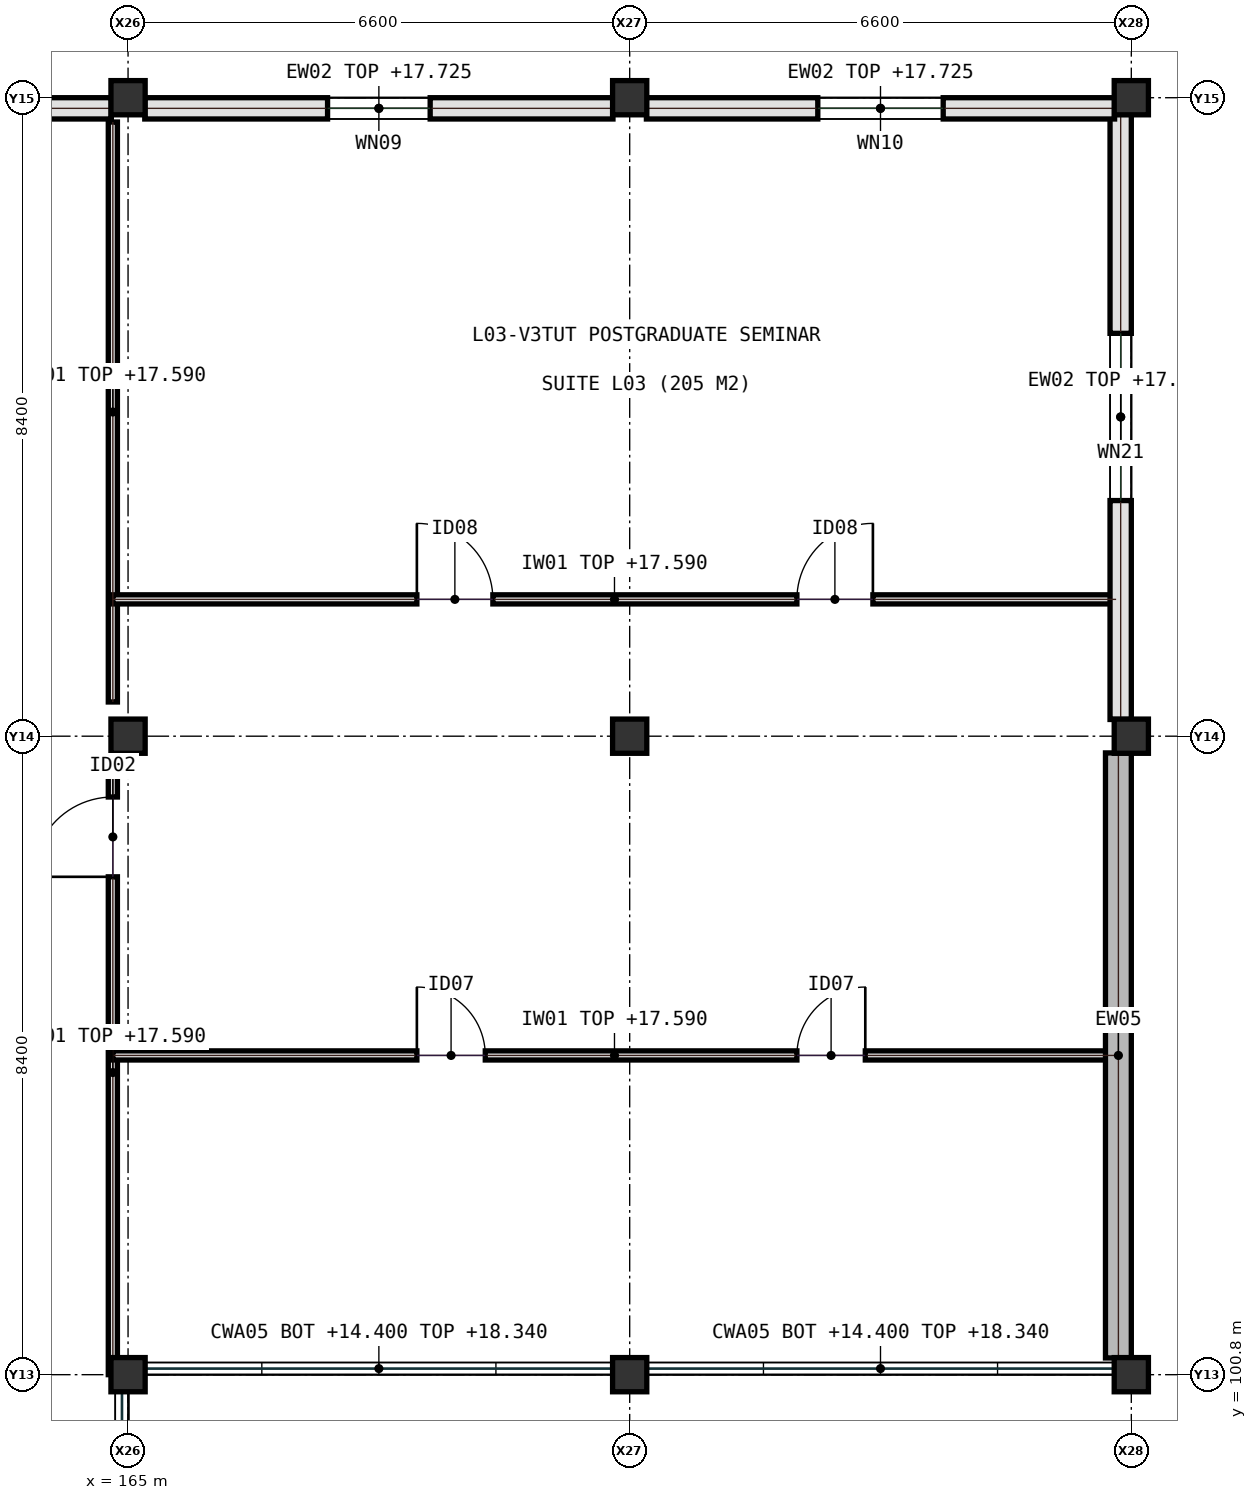
"""IFC4 building model, lengths in metres.
Left out: names, types, materials, properties, quantities, classifications, styles, units other than length and angle.
Written with IfcOpenShell. Run it as: python <this file> out.ifc"""

import sys

from ifc_helpers import new_model, si_unit, direction, frame, frame_2d, origin, origin_2d, place, context, subcontext, project, spatial, rectangle, extrude, element, fill, save


model = new_model("IFC4")
c1 = context("Model", 3, precision=1e-05, world=origin(), true_north=direction((0.0, 1.0)))
c2 = subcontext(c1, "Body", "Model", "MODEL_VIEW")
j1 = project(units=[si_unit("LENGTHUNIT", "METRE"), si_unit("PLANEANGLEUNIT", "RADIAN")], contexts=[c1])
p1 = place(None, origin())
s1 = spatial("IfcSite", under=j1, at=p1, CompositionType="ELEMENT")
p2 = place(p1, origin())
s2 = spatial("IfcBuilding", under=s1, at=p2, CompositionType="ELEMENT")
p3 = place(p2, frame((0.0, 0.0, 14.4)))
s3 = spatial("IfcBuildingStorey", under=s2, at=p3, CompositionType="ELEMENT", Elevation=14.4)
for number, where, z_axis, x_axis in (
    (1, (165.0, 100.8, 0.0), (0.0, 0.0, 1.0), (1.0, 0.0, 0.0)),
    (2, (165.0, 109.2, 0.0), (0.0, 0.0, 1.0), (1.0, 0.0, 0.0)),
    (3, (165.0, 117.6, 0.0), (0.0, 0.0, 1.0), (1.0, 0.0, 0.0)),
    (4, (171.6, 100.8, 0.0), (0.0, 0.0, 1.0), (1.0, 0.0, 0.0)),
    (5, (171.6, 109.2, 0.0), (0.0, 0.0, 1.0), (1.0, 0.0, 0.0)),
    (6, (171.6, 117.6, 0.0), (0.0, 0.0, 1.0), (1.0, 0.0, 0.0)),
    (7, (178.2, 100.8, 0.0), (0.0, 0.0, 1.0), (1.0, 0.0, 0.0)),
    (8, (178.2, 109.2, 0.0), (0.0, 0.0, 1.0), (1.0, 0.0, 0.0)),
    (9, (178.2, 117.6, 0.0), (0.0, 0.0, 1.0), (1.0, 0.0, 0.0)),
):
    element("IfcColumn", number, at=place(p3, frame(where, z_axis=z_axis, x_axis=x_axis)), inside=s3, PredefinedType="COLUMN", context=c2, shape_type="SweptSolid", body=[
        extrude(rectangle(XDim=0.45, YDim=0.45, at=origin_2d()), origin(), (0.0, 0.0, 1.0), 4.2),
    ])
p4 = place(p3, frame((164.8, 100.8, 0.0), z_axis=(0.0, 0.0, 1.0), x_axis=(0.0, 1.0, 0.0)))
e10 = element("IfcWall", 10, at=p4, inside=s3, PredefinedType="PARTITIONING", context=c2, shape_type="SweptSolid", body=[
    extrude(rectangle(XDim=7.95, YDim=0.12, at=frame_2d((3.975, 0.0))), origin(), (0.0, 0.0, 1.0), 3.19),
])
p5 = place(p4, frame((6.55, 0.0, 0.0)))
e11 = element("IfcOpeningElement", 11, at=p5, cuts=e10, PredefinedType="OPENING", context=c2, shape_type="SweptSolid", body=[
    extrude(rectangle(XDim=1.05, YDim=2.15, at=frame_2d((0.525, 1.075))), frame((0.0, 0.07, 0.0), z_axis=(0.0, -1.0, 0.0), x_axis=(1.0, 0.0, 0.0)), (0.0, 0.0, 1.0), 0.14),
])
p6 = place(p3, frame((164.8, 109.65, 0.0), z_axis=(0.0, 0.0, 1.0), x_axis=(0.0, 1.0, 0.0)))
e12 = element("IfcWall", 12, at=p6, inside=s3, PredefinedType="PARTITIONING", context=c2, shape_type="SweptSolid", body=[
    extrude(rectangle(XDim=7.63, YDim=0.12, at=frame_2d((3.815, 0.0))), origin(), (0.0, 0.0, 1.0), 3.19),
])
p7 = place(p3, frame((164.8, 105.0, 0.0), z_axis=(0.0, 0.0, 1.0), x_axis=(1.0, 0.0, 0.0)))
e13 = element("IfcWall", 13, at=p7, inside=s3, PredefinedType="PARTITIONING", context=c2, shape_type="SweptSolid", body=[
    extrude(rectangle(XDim=13.2, YDim=0.12, at=frame_2d((6.6, 0.0))), origin(), (0.0, 0.0, 1.0), 3.19),
])
p8 = place(p7, frame((4.0, 0.0, 0.0)))
e14 = element("IfcOpeningElement", 14, at=p8, cuts=e13, PredefinedType="OPENING", context=c2, shape_type="SweptSolid", body=[
    extrude(rectangle(XDim=0.9, YDim=2.1, at=frame_2d((0.45, 1.05))), frame((0.0, 0.07, 0.0), z_axis=(0.0, -1.0, 0.0), x_axis=(1.0, 0.0, 0.0)), (0.0, 0.0, 1.0), 0.14),
])
p9 = place(p7, frame((9.0, 0.0, 0.0)))
e15 = element("IfcOpeningElement", 15, at=p9, cuts=e13, PredefinedType="OPENING", context=c2, shape_type="SweptSolid", body=[
    extrude(rectangle(XDim=0.9, YDim=2.1, at=frame_2d((0.45, 1.05))), frame((0.0, 0.07, 0.0), z_axis=(0.0, -1.0, 0.0), x_axis=(1.0, 0.0, 0.0)), (0.0, 0.0, 1.0), 0.14),
])
p10 = place(p3, frame((164.8, 111.0, 0.0), z_axis=(0.0, 0.0, 1.0), x_axis=(1.0, 0.0, 0.0)))
e16 = element("IfcWall", 16, at=p10, inside=s3, PredefinedType="PARTITIONING", context=c2, shape_type="SweptSolid", body=[
    extrude(rectangle(XDim=13.2, YDim=0.12, at=frame_2d((6.6, 0.0))), origin(), (0.0, 0.0, 1.0), 3.19),
])
p11 = place(p10, frame((4.0, 0.0, 0.0)))
e17 = element("IfcOpeningElement", 17, at=p11, cuts=e16, PredefinedType="OPENING", context=c2, shape_type="SweptSolid", body=[
    extrude(rectangle(XDim=1.0, YDim=2.2, at=frame_2d((0.5, 1.1))), frame((0.0, 0.07, 0.0), z_axis=(0.0, -1.0, 0.0), x_axis=(1.0, 0.0, 0.0)), (0.0, 0.0, 1.0), 0.14),
])
p12 = place(p10, frame((9.0, 0.0, 0.0)))
e18 = element("IfcOpeningElement", 18, at=p12, cuts=e16, PredefinedType="OPENING", context=c2, shape_type="SweptSolid", body=[
    extrude(rectangle(XDim=1.0, YDim=2.2, at=frame_2d((0.5, 1.1))), frame((0.0, 0.07, 0.0), z_axis=(0.0, -1.0, 0.0), x_axis=(1.0, 0.0, 0.0)), (0.0, 0.0, 1.0), 0.14),
])
p13 = place(p3, frame((164.78, 117.46, 0.0), z_axis=(0.0, 0.0, 1.0), x_axis=(-1.0, 0.0, 0.0)))
e19 = element("IfcWall", 19, at=p13, inside=s3, PredefinedType="SOLIDWALL", context=c2, shape_type="SweptSolid", body=[
    extrude(rectangle(XDim=6.16, YDim=0.28, at=frame_2d((3.08, 0.0))), origin(), (0.0, 0.0, 1.0), 3.325),
])
p14 = place(p13, frame((1.28, 0.0, 0.95)))
e20 = element("IfcOpeningElement", 20, at=p14, cuts=e19, PredefinedType="OPENING", context=c2, shape_type="SweptSolid", body=[
    extrude(rectangle(XDim=3.6, YDim=2.0, at=frame_2d((1.8, 1.0))), frame((0.0, 0.15, 0.0), z_axis=(0.0, -1.0, 0.0), x_axis=(1.0, 0.0, 0.0)), (0.0, 0.0, 1.0), 0.3),
])
p15 = place(p3, frame((171.38, 117.46, 0.0), z_axis=(0.0, 0.0, 1.0), x_axis=(-1.0, 0.0, 0.0)))
e21 = element("IfcWall", 21, at=p15, inside=s3, PredefinedType="SOLIDWALL", context=c2, shape_type="SweptSolid", body=[
    extrude(rectangle(XDim=6.16, YDim=0.28, at=frame_2d((3.08, 0.0))), origin(), (0.0, 0.0, 1.0), 3.325),
])
p16 = place(p15, frame((2.405, 0.0, 0.95)))
e22 = element("IfcOpeningElement", 22, at=p16, cuts=e21, PredefinedType="OPENING", context=c2, shape_type="SweptSolid", body=[
    extrude(rectangle(XDim=1.35, YDim=1.55, at=frame_2d((0.675, 0.775))), frame((0.0, 0.15, 0.0), z_axis=(0.0, -1.0, 0.0), x_axis=(1.0, 0.0, 0.0)), (0.0, 0.0, 1.0), 0.3),
])
p17 = place(p3, frame((178.03, 101.02, 0.0), z_axis=(0.0, 0.0, 1.0), x_axis=(0.0, 1.0, 0.0)))
e23 = element("IfcWall", 23, at=p17, inside=s3, PredefinedType="SHEAR", context=c2, shape_type="SweptSolid", body=[
    extrude(rectangle(XDim=7.96, YDim=0.34, at=frame_2d((3.98, 0.0))), origin(), (0.0, 0.0, 1.0), 3.94),
])
p18 = place(p3, frame((178.06, 109.42, 0.0), z_axis=(0.0, 0.0, 1.0), x_axis=(0.0, 1.0, 0.0)))
e24 = element("IfcWall", 24, at=p18, inside=s3, PredefinedType="SOLIDWALL", context=c2, shape_type="SweptSolid", body=[
    extrude(rectangle(XDim=7.96, YDim=0.28, at=frame_2d((3.98, 0.0))), origin(), (0.0, 0.0, 1.0), 3.375),
])
p19 = place(p18, frame((2.88, 0.0, 0.95)))
e25 = element("IfcOpeningElement", 25, at=p19, cuts=e24, PredefinedType="OPENING", context=c2, shape_type="SweptSolid", body=[
    extrude(rectangle(XDim=2.2, YDim=1.85, at=frame_2d((1.1, 0.925))), frame((0.0, 0.15, 0.0), z_axis=(0.0, -1.0, 0.0), x_axis=(1.0, 0.0, 0.0)), (0.0, 0.0, 1.0), 0.3),
])
p20 = place(p3, frame((177.98, 117.46, 0.0), z_axis=(0.0, 0.0, 1.0), x_axis=(-1.0, 0.0, 0.0)))
e26 = element("IfcWall", 26, at=p20, inside=s3, PredefinedType="SOLIDWALL", context=c2, shape_type="SweptSolid", body=[
    extrude(rectangle(XDim=6.16, YDim=0.28, at=frame_2d((3.08, 0.0))), origin(), (0.0, 0.0, 1.0), 3.325),
])
p21 = place(p20, frame((2.255, 0.0, 0.95)))
e27 = element("IfcOpeningElement", 27, at=p21, cuts=e26, PredefinedType="OPENING", context=c2, shape_type="SweptSolid", body=[
    extrude(rectangle(XDim=1.65, YDim=1.55, at=frame_2d((0.825, 0.775))), frame((0.0, 0.15, 0.0), z_axis=(0.0, -1.0, 0.0), x_axis=(1.0, 0.0, 0.0)), (0.0, 0.0, 1.0), 0.3),
])
p22 = place(p5, origin())
e28 = element("IfcDoor", 28, at=p22, inside=s3, OperationType="SINGLE_SWING_LEFT", PredefinedType="DOOR", context=c2, shape_type="SweptSolid", body=[
    extrude(rectangle(XDim=1.05, YDim=2.15, at=frame_2d((0.525, 1.075))), frame((0.0, 0.025, 0.0), z_axis=(0.0, -1.0, 0.0), x_axis=(1.0, 0.0, 0.0)), (0.0, 0.0, 1.0), 0.05),
])
fill(e11, e28)
p23 = place(p8, origin())
e29 = element("IfcDoor", 29, at=p23, inside=s3, OperationType="SINGLE_SWING_LEFT", PredefinedType="DOOR", context=c2, shape_type="SweptSolid", body=[
    extrude(rectangle(XDim=0.9, YDim=2.1, at=frame_2d((0.45, 1.05))), frame((0.0, 0.025, 0.0), z_axis=(0.0, -1.0, 0.0), x_axis=(1.0, 0.0, 0.0)), (0.0, 0.0, 1.0), 0.05),
])
fill(e14, e29)
p24 = place(p9, origin())
e30 = element("IfcDoor", 30, at=p24, inside=s3, OperationType="SINGLE_SWING_RIGHT", PredefinedType="DOOR", context=c2, shape_type="SweptSolid", body=[
    extrude(rectangle(XDim=0.9, YDim=2.1, at=frame_2d((0.45, 1.05))), frame((0.0, 0.025, 0.0), z_axis=(0.0, -1.0, 0.0), x_axis=(1.0, 0.0, 0.0)), (0.0, 0.0, 1.0), 0.05),
])
fill(e15, e30)
p25 = place(p11, origin())
e31 = element("IfcDoor", 31, at=p25, inside=s3, OperationType="SINGLE_SWING_LEFT", PredefinedType="DOOR", context=c2, shape_type="SweptSolid", body=[
    extrude(rectangle(XDim=1.0, YDim=2.2, at=frame_2d((0.5, 1.1))), frame((0.0, 0.025, 0.0), z_axis=(0.0, -1.0, 0.0), x_axis=(1.0, 0.0, 0.0)), (0.0, 0.0, 1.0), 0.05),
])
fill(e17, e31)
p26 = place(p12, origin())
e32 = element("IfcDoor", 32, at=p26, inside=s3, OperationType="SINGLE_SWING_RIGHT", PredefinedType="DOOR", context=c2, shape_type="SweptSolid", body=[
    extrude(rectangle(XDim=1.0, YDim=2.2, at=frame_2d((0.5, 1.1))), frame((0.0, 0.025, 0.0), z_axis=(0.0, -1.0, 0.0), x_axis=(1.0, 0.0, 0.0)), (0.0, 0.0, 1.0), 0.05),
])
fill(e18, e32)
p27 = place(p16, origin())
e33 = element("IfcWindow", 33, at=p27, inside=s3, PartitioningType="SINGLE_PANEL", PredefinedType="WINDOW", context=c2, shape_type="SweptSolid", body=[
    extrude(rectangle(XDim=1.35, YDim=1.55, at=frame_2d((0.675, 0.775))), frame((0.0, 0.03, 0.0), z_axis=(0.0, -1.0, 0.0), x_axis=(1.0, 0.0, 0.0)), (0.0, 0.0, 1.0), 0.06),
])
fill(e22, e33)
p28 = place(p19, origin())
e34 = element("IfcWindow", 34, at=p28, inside=s3, PartitioningType="SINGLE_PANEL", PredefinedType="WINDOW", context=c2, shape_type="SweptSolid", body=[
    extrude(rectangle(XDim=2.2, YDim=1.85, at=frame_2d((1.1, 0.925))), frame((0.0, 0.03, 0.0), z_axis=(0.0, -1.0, 0.0), x_axis=(1.0, 0.0, 0.0)), (0.0, 0.0, 1.0), 0.06),
])
fill(e25, e34)
p29 = place(p21, origin())
e35 = element("IfcWindow", 35, at=p29, inside=s3, PartitioningType="SINGLE_PANEL", PredefinedType="WINDOW", context=c2, shape_type="SweptSolid", body=[
    extrude(rectangle(XDim=1.65, YDim=1.55, at=frame_2d((0.825, 0.775))), frame((0.0, 0.03, 0.0), z_axis=(0.0, -1.0, 0.0), x_axis=(1.0, 0.0, 0.0)), (0.0, 0.0, 1.0), 0.06),
])
fill(e27, e35)
save(model, sys.argv[1])
